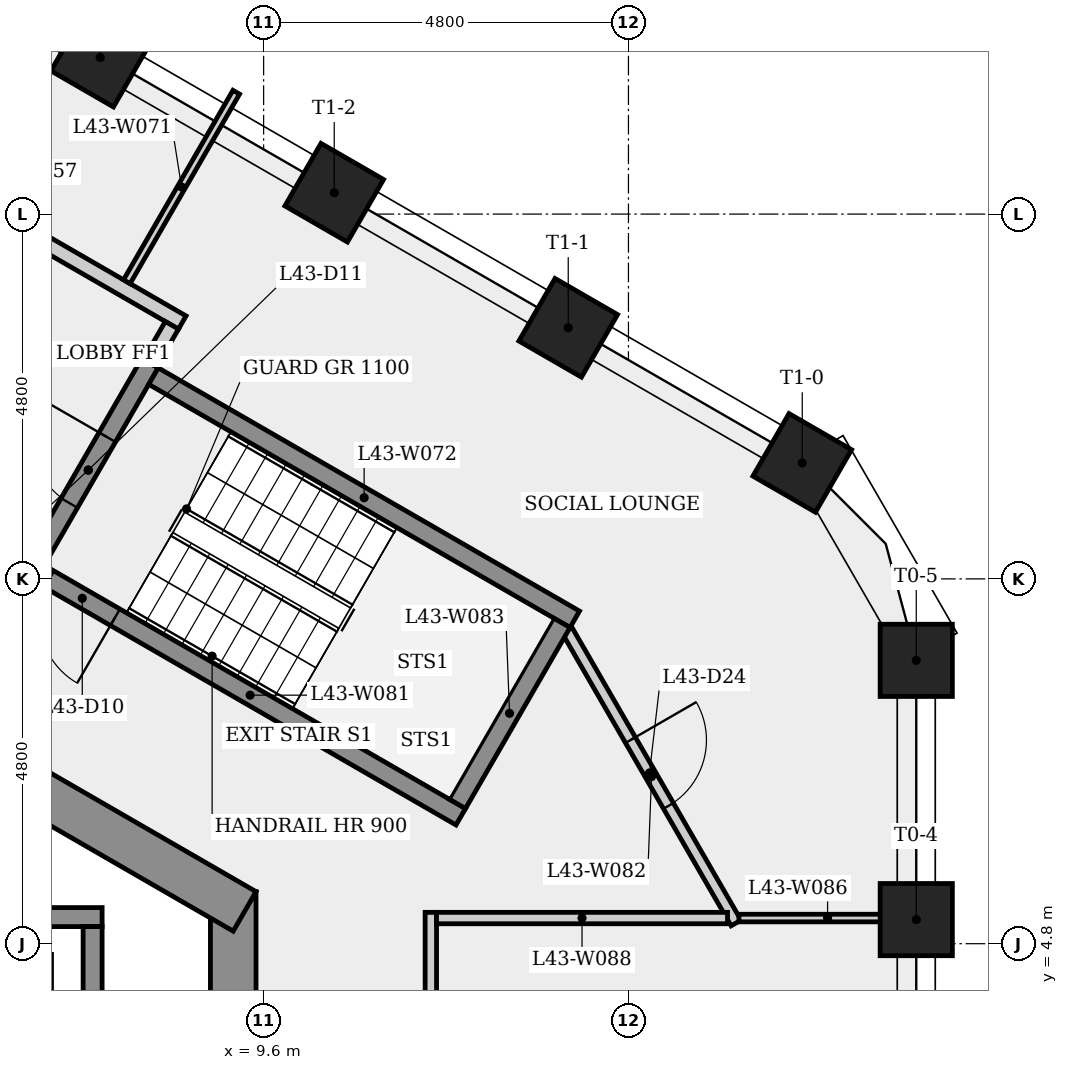
"""IFC4 building model, lengths in metres.
Left out: names, types, materials, properties, quantities, classifications, styles, units other than length and angle.
Written with IfcOpenShell. Run it as: python <this file> out.ifc"""

import sys

from ifc_helpers import new_model, si_unit, direction, frame, frame_2d, origin, origin_2d, place, context, subcontext, project, spatial, rectangle, extrude, element, fill, save


model = new_model("IFC4")
c1 = context("Model", 3, precision=1e-05, world=origin(), true_north=direction((0.0, 1.0)))
c2 = subcontext(c1, "Body", "Model", "MODEL_VIEW")
j1 = project(units=[si_unit("LENGTHUNIT", "METRE"), si_unit("PLANEANGLEUNIT", "RADIAN")], contexts=[c1])
p1 = place(None, origin())
s1 = spatial("IfcSite", under=j1, at=p1, CompositionType="ELEMENT")
p2 = place(p1, origin())
s2 = spatial("IfcBuilding", under=s1, at=p2, CompositionType="ELEMENT")
p3 = place(p2, frame((0.0, 0.0, 162.9)))
s3 = spatial("IfcBuildingStorey", under=s2, at=p3, CompositionType="ELEMENT", Elevation=162.9)
p4 = place(p3, frame((9.2, -5.485, 0.0), z_axis=(0.0, 0.0, 1.0), x_axis=(0.0, 1.0, 0.0)))
e1 = element("IfcWall", 1, at=p4, inside=s3, PredefinedType="SHEAR", context=c2, shape_type="SweptSolid", body=[
    extrude(rectangle(XDim=10.97, YDim=0.6, at=frame_2d((5.485, 0.0))), origin(), (0.0, 0.0, 1.0), 3.4),
])
p5 = place(p4, frame((4.685, 0.0, 0.0)))
e2 = element("IfcOpeningElement", 2, at=p5, cuts=e1, PredefinedType="OPENING", context=c2, shape_type="SweptSolid", body=[
    extrude(rectangle(XDim=1.6, YDim=2.1, at=frame_2d((0.8, 1.05))), frame((0.0, 0.31, 0.0), z_axis=(0.0, -1.0, 0.0), x_axis=(1.0, 0.0, 0.0)), (0.0, 0.0, 1.0), 0.62),
])
p6 = place(p3, frame((9.35, 5.225, 0.0), z_axis=(0.0, 0.0, 1.0), x_axis=(-0.866023993627, 0.500002442456, 0.0)))
e3 = element("IfcWall", 3, at=p6, inside=s3, PredefinedType="SHEAR", context=c2, shape_type="SweptSolid", body=[
    extrude(rectangle(XDim=10.97, YDim=0.6, at=frame_2d((5.485, 0.0))), origin(), (0.0, 0.0, 1.0), 3.4),
])
p7 = place(p6, frame((5.393, 0.0, 0.0)))
e4 = element("IfcOpeningElement", 4, at=p7, cuts=e3, PredefinedType="OPENING", context=c2, shape_type="SweptSolid", body=[
    extrude(rectangle(XDim=0.9, YDim=2.1, at=frame_2d((0.45, 1.05))), frame((0.0, 0.31, 0.0), z_axis=(0.0, -1.0, 0.0), x_axis=(1.0, 0.0, 0.0)), (0.0, 0.0, 1.0), 0.62),
])
for number, where, z_axis, x_axis in (
    (5, (18.187, 5.117, 0.0), (0.0, 0.0, 1.0), (1.0, 0.0, 0.0)),
    (6, (18.187, 8.528, 0.0), (0.0, 0.0, 1.0), (1.0, 0.0, 0.0)),
    (7, (16.687, 11.126, 0.0), (0.0, 0.0, 1.0), (0.5, 0.866, 0.0)),
    (8, (13.608, 12.904, 0.0), (0.0, 0.0, 1.0), (0.5, 0.866, 0.0)),
    (9, (10.529, 14.681, 0.0), (0.0, 0.0, 1.0), (0.5, 0.866, 0.0)),
    (10, (7.45, 16.459, 0.0), (0.0, 0.0, 1.0), (0.5, 0.866, 0.0)),
):
    element("IfcColumn", number, at=place(p3, frame(where, z_axis=z_axis, x_axis=x_axis)), inside=s3, PredefinedType="COLUMN", context=c2, shape_type="SweptSolid", body=[
        extrude(rectangle(XDim=0.95, YDim=0.95, at=origin_2d()), origin(), (0.0, 0.0, 1.0), 3.4),
    ])
p8 = place(p3, frame((-7.225, 5.15, 0.0), z_axis=(0.0, 0.0, 1.0), x_axis=(1.0, 0.0, 0.0)))
e11 = element("IfcWall", 11, at=p8, inside=s3, PredefinedType="SHEAR", context=c2, shape_type="SweptSolid", body=[
    extrude(rectangle(XDim=14.7, YDim=0.25, at=frame_2d((7.35, 0.0))), origin(), (0.0, 0.0, 1.0), 3.05),
])
p9 = place(p3, frame((4.459, 15.323, 0.0), z_axis=(0.0, 0.0, 1.0), x_axis=(0.866016039709, -0.500016218704, 0.0)))
e12 = element("IfcWall", 12, at=p9, inside=s3, PredefinedType="PARTITIONING", context=c2, shape_type="SweptSolid", body=[
    extrude(rectangle(XDim=4.7, YDim=0.2, at=frame_2d((2.35, 0.0))), origin(), (0.0, 0.0, 1.0), 3.05),
])
p10 = place(p3, frame((6.48, 9.624, 0.0), z_axis=(0.0, 0.0, 1.0), x_axis=(0.500017246033, 0.866015446554, 0.0)))
e13 = element("IfcWall", 13, at=p10, inside=s3, PredefinedType="SHEAR", context=c2, shape_type="SweptSolid", body=[
    extrude(rectangle(XDim=3.25, YDim=0.25, at=frame_2d((1.625, 0.0))), origin(), (0.0, 0.0, 1.0), 3.05),
])
p11 = place(p10, frame((1.125, 0.0, 0.0)))
e14 = element("IfcOpeningElement", 14, at=p11, cuts=e13, PredefinedType="OPENING", context=c2, shape_type="SweptSolid", body=[
    extrude(rectangle(XDim=1.0, YDim=2.1, at=frame_2d((0.5, 1.05))), frame((0.0, 0.135, 0.0), z_axis=(0.0, -1.0, 0.0), x_axis=(1.0, 0.0, 0.0)), (0.0, 0.0, 1.0), 0.27),
])
p12 = place(p3, frame((7.35, 5.025, 0.0), z_axis=(0.0, 0.0, 1.0), x_axis=(0.0, -1.0, 0.0)))
e15 = element("IfcWall", 15, at=p12, inside=s3, PredefinedType="SHEAR", context=c2, shape_type="SweptSolid", body=[
    extrude(rectangle(XDim=3.1, YDim=0.25, at=frame_2d((1.55, 0.0))), origin(), (0.0, 0.0, 1.0), 3.4),
])
p13 = place(p3, frame((7.8, 13.51, 0.0), z_axis=(0.0, 0.0, 1.0), x_axis=(0.499996461177, 0.866027446915, 0.0)))
e16 = element("IfcWall", 16, at=p13, inside=s3, PredefinedType="PARTITIONING", context=c2, shape_type="SweptSolid", body=[
    extrude(rectangle(XDim=2.879, YDim=0.1, at=frame_2d((1.44, 0.0))), origin(), (0.0, 0.0, 1.0), 3.05),
])
p14 = place(p3, frame((8.151, 12.268, 0.0), z_axis=(0.0, 0.0, 1.0), x_axis=(0.866025499775, -0.499999833739, 0.0)))
e17 = element("IfcWall", 17, at=p14, inside=s3, PredefinedType="SHEAR", context=c2, shape_type="SweptSolid", body=[
    extrude(rectangle(XDim=6.4, YDim=0.25, at=frame_2d((3.2, 0.0))), origin(), (0.0, 0.0, 1.0), 3.05),
])
p15 = place(p3, frame((8.393, 12.937, 0.0), z_axis=(0.0, 0.0, 1.0), x_axis=(-0.500065409566, -0.86598763626, 0.0)))
e18 = element("IfcWall", 18, at=p15, inside=s3, PredefinedType="PARTITIONING", context=c2, shape_type="SweptSolid", body=[
    extrude(rectangle(XDim=0.575, YDim=0.2, at=frame_2d((0.288, 0.0))), origin(), (0.0, 0.0, 1.0), 3.05),
])
p16 = place(p3, frame((11.8, -5.062, 0.0), z_axis=(0.0, 0.0, 1.0), x_axis=(0.0, 1.0, 0.0)))
e19 = element("IfcWall", 19, at=p16, inside=s3, PredefinedType="PARTITIONING", context=c2, shape_type="SweptSolid", body=[
    extrude(rectangle(XDim=10.275, YDim=0.15, at=frame_2d((5.137, 0.0))), origin(), (0.0, 0.0, 1.0), 3.05),
])
p17 = place(p16, frame((2.05, 0.0, 0.0)))
e20 = element("IfcOpeningElement", 20, at=p17, cuts=e19, PredefinedType="OPENING", context=c2, shape_type="SweptSolid", body=[
    extrude(rectangle(XDim=0.9, YDim=2.1, at=frame_2d((0.45, 1.05))), frame((0.0, 0.085, 0.0), z_axis=(0.0, -1.0, 0.0), x_axis=(1.0, 0.0, 0.0)), (0.0, 0.0, 1.0), 0.17),
])
p18 = place(p16, frame((6.275, 0.0, 0.0)))
e21 = element("IfcOpeningElement", 21, at=p18, cuts=e19, PredefinedType="OPENING", context=c2, shape_type="SweptSolid", body=[
    extrude(rectangle(XDim=1.0, YDim=2.1, at=frame_2d((0.5, 1.05))), frame((0.0, 0.085, 0.0), z_axis=(0.0, -1.0, 0.0), x_axis=(1.0, 0.0, 0.0)), (0.0, 0.0, 1.0), 0.17),
])
p19 = place(p3, frame((12.194, 6.47, 0.0), z_axis=(0.0, 0.0, 1.0), x_axis=(-0.866025499775, 0.499999833739, 0.0)))
e22 = element("IfcWall", 22, at=p19, inside=s3, PredefinedType="SHEAR", context=c2, shape_type="SweptSolid", body=[
    extrude(rectangle(XDim=6.4, YDim=0.25, at=frame_2d((3.2, 0.0))), origin(), (0.0, 0.0, 1.0), 3.05),
])
p20 = place(p19, frame((5.25, 0.0, 0.0)))
e23 = element("IfcOpeningElement", 23, at=p20, cuts=e22, PredefinedType="OPENING", context=c2, shape_type="SweptSolid", body=[
    extrude(rectangle(XDim=1.0, YDim=2.1, at=frame_2d((0.5, 1.05))), frame((0.0, 0.135, 0.0), z_axis=(0.0, -1.0, 0.0), x_axis=(1.0, 0.0, 0.0)), (0.0, 0.0, 1.0), 0.27),
])
p21 = place(p3, frame((13.592, 8.925, 0.0), z_axis=(0.0, 0.0, 1.0), x_axis=(0.500040754433, -0.866001872923, 0.0)))
e24 = element("IfcWall", 24, at=p21, inside=s3, PredefinedType="PARTITIONING", context=c2, shape_type="SweptSolid", body=[
    extrude(rectangle(XDim=4.448, YDim=0.15, at=frame_2d((2.224, 0.0))), origin(), (0.0, 0.0, 1.0), 3.05),
])
p22 = place(p21, frame((1.669, 0.0, 0.0)))
e25 = element("IfcOpeningElement", 25, at=p22, cuts=e24, PredefinedType="OPENING", context=c2, shape_type="SweptSolid", body=[
    extrude(rectangle(XDim=1.0, YDim=2.1, at=frame_2d((0.5, 1.05))), frame((0.0, 0.085, 0.0), z_axis=(0.0, -1.0, 0.0), x_axis=(1.0, 0.0, 0.0)), (0.0, 0.0, 1.0), 0.17),
])
p23 = place(p3, frame((12.148, 6.641, 0.0), z_axis=(0.0, 0.0, 1.0), x_axis=(0.500034990121, 0.866005201286, 0.0)))
e26 = element("IfcWall", 26, at=p23, inside=s3, PredefinedType="SHEAR", context=c2, shape_type="SweptSolid", body=[
    extrude(rectangle(XDim=2.75, YDim=0.25, at=frame_2d((1.375, 0.0))), origin(), (0.0, 0.0, 1.0), 3.05),
])
p24 = place(p3, frame((15.853, 5.137, 0.0), z_axis=(0.0, 0.0, 1.0), x_axis=(1.0, 0.0, 0.0)))
e27 = element("IfcWall", 27, at=p24, inside=s3, PredefinedType="PARTITIONING", context=c2, shape_type="SweptSolid", body=[
    extrude(rectangle(XDim=2.333, YDim=0.1, at=frame_2d((1.167, 0.0))), origin(), (0.0, 0.0, 1.0), 3.05),
])
p25 = place(p3, frame((15.703, 5.137, 0.0), z_axis=(0.0, 0.0, 1.0), x_axis=(-1.0, 0.0, 0.0)))
e28 = element("IfcWall", 28, at=p25, inside=s3, PredefinedType="PARTITIONING", context=c2, shape_type="SweptSolid", body=[
    extrude(rectangle(XDim=3.828, YDim=0.15, at=frame_2d((1.914, 0.0))), origin(), (0.0, 0.0, 1.0), 3.05),
])
p26 = place(p20, origin())
e29 = element("IfcDoor", 29, at=p26, inside=s3, OperationType="SINGLE_SWING_LEFT", PredefinedType="DOOR", context=c2, shape_type="SweptSolid", body=[
    extrude(rectangle(XDim=1.0, YDim=2.1, at=frame_2d((0.5, 1.05))), frame((0.0, 0.025, 0.0), z_axis=(0.0, -1.0, 0.0), x_axis=(1.0, 0.0, 0.0)), (0.0, 0.0, 1.0), 0.05),
])
fill(e23, e29)
p27 = place(p11, origin())
e30 = element("IfcDoor", 30, at=p27, inside=s3, OperationType="SINGLE_SWING_RIGHT", PredefinedType="DOOR", context=c2, shape_type="SweptSolid", body=[
    extrude(rectangle(XDim=1.0, YDim=2.1, at=frame_2d((0.5, 1.05))), frame((0.0, 0.025, 0.0), z_axis=(0.0, -1.0, 0.0), x_axis=(1.0, 0.0, 0.0)), (0.0, 0.0, 1.0), 0.05),
])
fill(e14, e30)
p28 = place(p22, origin())
e31 = element("IfcDoor", 31, at=p28, inside=s3, OperationType="SINGLE_SWING_LEFT", PredefinedType="DOOR", context=c2, shape_type="SweptSolid", body=[
    extrude(rectangle(XDim=1.0, YDim=2.1, at=frame_2d((0.5, 1.05))), frame((0.0, 0.025, 0.0), z_axis=(0.0, -1.0, 0.0), x_axis=(1.0, 0.0, 0.0)), (0.0, 0.0, 1.0), 0.05),
])
fill(e25, e31)
save(model, sys.argv[1])
